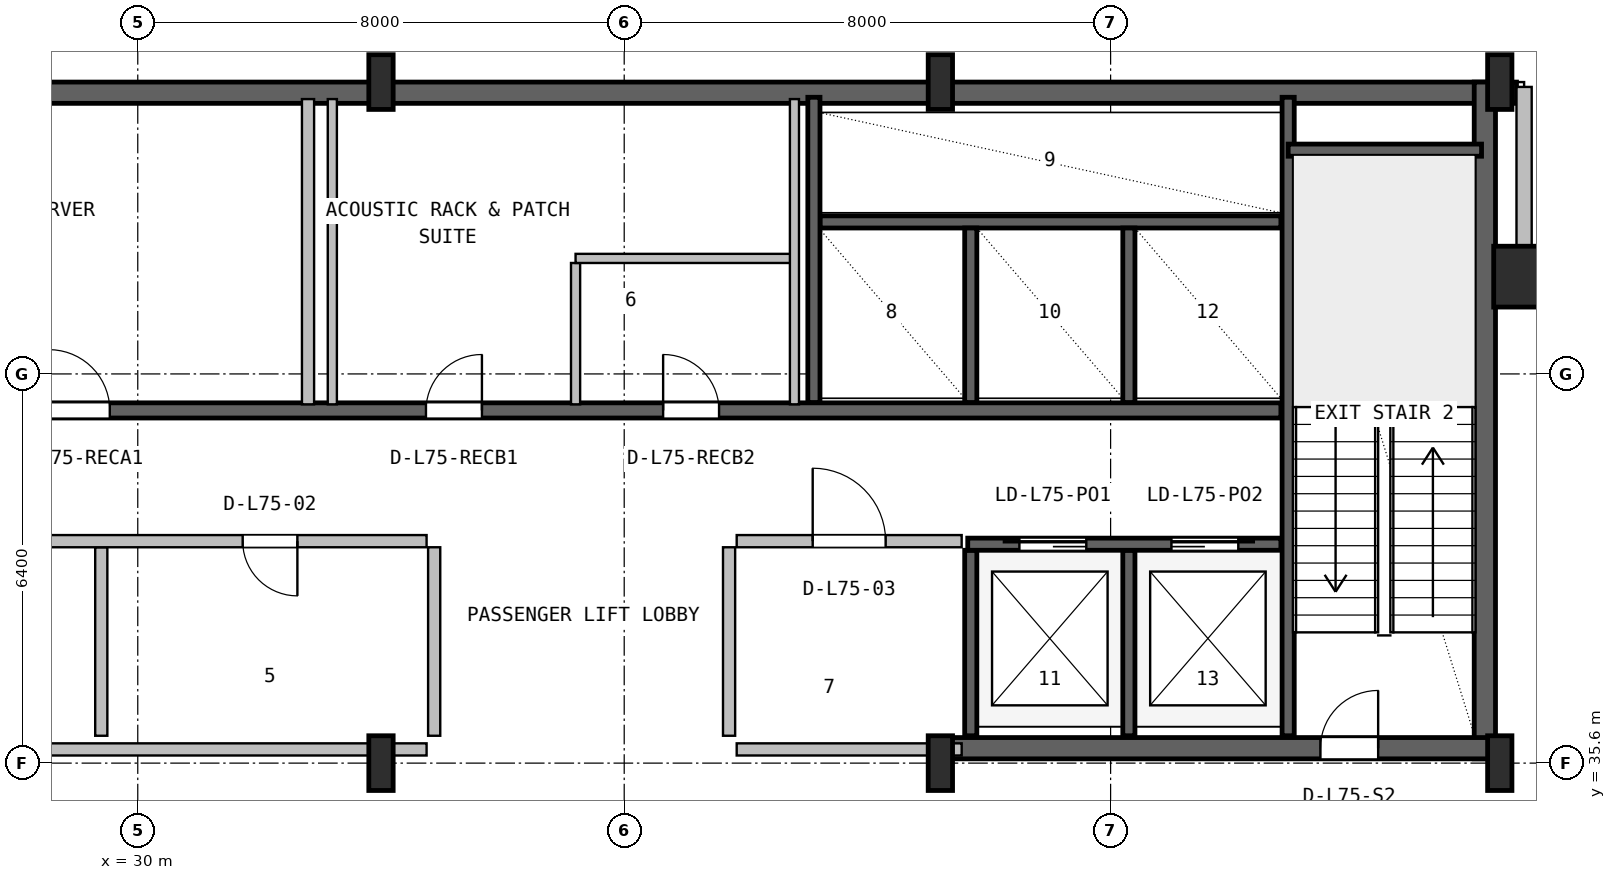
"""IFC4 building model, lengths in metres.
Left out: names, types, materials, properties, quantities, classifications, styles, units other than length and angle.
Written with IfcOpenShell. Run it as: python <this file> out.ifc"""

import sys

from ifc_helpers import new_model, si_unit, direction, frame, frame_2d, origin, origin_2d, place, context, subcontext, project, spatial, rectangle, hollow_rectangle, i_section, extrude, source, transform, mapped, element, fill, save


model = new_model("IFC4")
c1 = context("Model", 3, precision=1e-05, world=origin(), true_north=direction((0.0, 1.0)))
c2 = subcontext(c1, "Body", "Model", "MODEL_VIEW")
j1 = project(units=[si_unit("LENGTHUNIT", "METRE"), si_unit("PLANEANGLEUNIT", "RADIAN")], contexts=[c1])
p1 = place(None, origin())
s1 = spatial("IfcSite", under=j1, at=p1, CompositionType="ELEMENT")
p2 = place(p1, origin())
s2 = spatial("IfcBuilding", under=s1, at=p2, CompositionType="ELEMENT")
p3 = place(p2, frame((0.0, 0.0, 300.2)))
s3 = spatial("IfcBuildingStorey", under=s2, at=p3, CompositionType="ELEMENT", Elevation=300.2)
p4 = place(p3, frame((15.325, 46.625, 0.0), z_axis=(0.0, 0.0, 1.0), x_axis=(1.0, 0.0, 0.0)))
e1 = element("IfcWall", 1, at=p4, inside=s3, PredefinedType="SHEAR", context=c2, shape_type="SweptSolid", body=[
    extrude(rectangle(XDim=37.35, YDim=0.35, at=frame_2d((18.675, 0.0))), origin(), (0.0, 0.0, 1.0), 4.52),
])
p5 = place(p3, frame((52.155, 35.67, 0.0), z_axis=(0.0, 0.0, 1.0), x_axis=(0.0, 1.0, 0.0)))
e2 = element("IfcWall", 2, at=p5, inside=s3, PredefinedType="SHEAR", context=c2, shape_type="SweptSolid", body=[
    extrude(rectangle(XDim=11.13, YDim=0.35, at=frame_2d((5.565, 0.0))), origin(), (0.0, 0.0, 1.0), 4.52),
])
p6 = place(p3, frame((43.2, 35.845, 0.0), z_axis=(0.0, 0.0, 1.0), x_axis=(1.0, 0.0, 0.0)))
e3 = element("IfcWall", 3, at=p6, inside=s3, PredefinedType="SHEAR", context=c2, shape_type="SweptSolid", body=[
    extrude(rectangle(XDim=9.13, YDim=0.35, at=frame_2d((4.565, 0.0))), origin(), (0.0, 0.0, 1.0), 4.52),
])
p7 = place(p6, frame((6.25, 0.0, 0.0)))
e4 = element("IfcOpeningElement", 4, at=p7, cuts=e3, PredefinedType="OPENING", context=c2, shape_type="SweptSolid", body=[
    extrude(rectangle(XDim=0.95, YDim=2.1, at=frame_2d((0.475, 1.05))), frame((0.0, 0.185, 0.0), z_axis=(0.0, -1.0, 0.0), x_axis=(1.0, 0.0, 0.0)), (0.0, 0.0, 1.0), 0.37),
])
m1 = source(origin(), c2, "Body", "SweptSolid", [
    extrude(i_section(OverallWidth=0.4, OverallDepth=0.9, WebThickness=0.016, FlangeThickness=0.028, FilletRadius=0.016, at=origin_2d()), origin(), (0.0, 0.0, 1.0), 4.8),
])
for number, where, z_axis, x_axis in (
    (5, (34.0, 35.6, 0.0), (0.0, 0.0, 1.0), (1.0, 0.0, 0.0)),
    (6, (34.0, 46.8, 0.0), (0.0, 0.0, 1.0), (1.0, 0.0, 0.0)),
    (7, (43.2, 35.6, 0.0), (0.0, 0.0, 1.0), (1.0, 0.0, 0.0)),
    (8, (43.2, 46.8, 0.0), (0.0, 0.0, 1.0), (1.0, 0.0, 0.0)),
    (9, (52.4, 35.6, 0.0), (0.0, 0.0, 1.0), (1.0, 0.0, 0.0)),
    (10, (52.4, 46.8, 0.0), (0.0, 0.0, 1.0), (1.0, 0.0, 0.0)),
):
    element("IfcColumn", number, at=place(p3, frame(where, z_axis=z_axis, x_axis=x_axis)), inside=s3, PredefinedType="COLUMN", context=c2, shape_type="MappedRepresentation", body=[
        mapped(m1, transform((0.0, 0.0, 0.0), x_axis=(1.0, 0.0, 0.0), y_axis=(0.0, 1.0, 0.0), z_axis=(0.0, 0.0, 1.0), scale=1.0)),
    ])
m2 = source(origin(), c2, "Body", "SweptSolid", [
    extrude(hollow_rectangle(XDim=1.0, YDim=1.0, WallThickness=0.04, at=origin_2d()), origin(), (0.0, 0.0, 1.0), 4.8),
])
p8 = place(p3, frame((52.8, 43.6, 0.0), z_axis=(0.0, 0.0, 1.0), x_axis=(1.0, 0.0, 0.0)))
e11 = element("IfcColumn", 11, at=p8, inside=s3, PredefinedType="COLUMN", context=c2, shape_type="MappedRepresentation", body=[
    mapped(m2, transform((0.0, 0.0, 0.0), x_axis=(1.0, 0.0, 0.0), y_axis=(0.0, 1.0, 0.0), z_axis=(0.0, 0.0, 1.0), scale=1.0)),
])
p9 = place(p3, frame((52.93, 43.6, 0.0), z_axis=(0.0, 0.0, 1.0), x_axis=(1.0, 0.0, 0.0)))
e12 = element("IfcWall", 12, at=p9, inside=s3, PredefinedType="SOLIDWALL", context=c2, shape_type="SweptSolid", body=[
    extrude(rectangle(XDim=2.99, YDim=0.25, at=frame_2d((1.495, 0.0))), origin(), (0.0, 0.0, 1.0), 4.5),
])
p10 = place(p3, frame((52.8, 43.52, 0.0), z_axis=(0.0, 0.0, 1.0), x_axis=(0.0, 1.0, 0.0)))
e13 = element("IfcWall", 13, at=p10, inside=s3, PredefinedType="SOLIDWALL", context=c2, shape_type="SweptSolid", body=[
    extrude(rectangle(XDim=3.2, YDim=0.25, at=frame_2d((1.6, 0.0))), origin(), (0.0, 0.0, 1.0), 4.141),
])
p11 = place(p3, frame((48.92, 36.05, 0.0), z_axis=(0.0, 0.0, 1.0), x_axis=(0.0, 1.0, 0.0)))
e14 = element("IfcWall", 14, at=p11, inside=s3, PredefinedType="SHEAR", context=c2, shape_type="SweptSolid", body=[
    extrude(rectangle(XDim=10.5, YDim=0.2, at=frame_2d((5.25, 0.0))), origin(), (0.0, 0.0, 1.0), 4.52),
])
p12 = place(p3, frame((48.92, 45.68, 0.0), z_axis=(0.0, 0.0, 1.0), x_axis=(1.0, 0.0, 0.0)))
e15 = element("IfcWall", 15, at=p12, inside=s3, PredefinedType="SHEAR", context=c2, shape_type="SweptSolid", body=[
    extrude(rectangle(XDim=3.18, YDim=0.2, at=frame_2d((1.59, 0.0))), origin(), (0.0, 0.0, 1.0), 4.52),
])
p13 = place(p3, frame((24.98, 41.4, 0.0), z_axis=(0.0, 0.0, 1.0), x_axis=(1.0, 0.0, 0.0)))
e16 = element("IfcWall", 16, at=p13, inside=s3, PredefinedType="SHEAR", context=c2, shape_type="SweptSolid", body=[
    extrude(rectangle(XDim=23.82, YDim=0.25, at=frame_2d((11.91, 0.0))), origin(), (0.0, 0.0, 1.0), 4.52),
])
p14 = place(p13, frame((3.56, 0.0, 0.0)))
e17 = element("IfcOpeningElement", 17, at=p14, cuts=e16, PredefinedType="OPENING", context=c2, shape_type="SweptSolid", body=[
    extrude(rectangle(XDim=1.0, YDim=2.08, at=frame_2d((0.5, 1.04))), frame((0.0, 0.135, 0.0), z_axis=(0.0, -1.0, 0.0), x_axis=(1.0, 0.0, 0.0)), (0.0, 0.0, 1.0), 0.27),
])
p15 = place(p13, frame((9.76, 0.0, 0.0)))
e18 = element("IfcOpeningElement", 18, at=p15, cuts=e16, PredefinedType="OPENING", context=c2, shape_type="SweptSolid", body=[
    extrude(rectangle(XDim=0.92, YDim=2.08, at=frame_2d((0.46, 1.04))), frame((0.0, 0.135, 0.0), z_axis=(0.0, -1.0, 0.0), x_axis=(1.0, 0.0, 0.0)), (0.0, 0.0, 1.0), 0.27),
])
p16 = place(p13, frame((13.66, 0.0, 0.0)))
e19 = element("IfcOpeningElement", 19, at=p16, cuts=e16, PredefinedType="OPENING", context=c2, shape_type="SweptSolid", body=[
    extrude(rectangle(XDim=0.92, YDim=2.08, at=frame_2d((0.46, 1.04))), frame((0.0, 0.135, 0.0), z_axis=(0.0, -1.0, 0.0), x_axis=(1.0, 0.0, 0.0)), (0.0, 0.0, 1.0), 0.27),
])
p17 = place(p3, frame((41.22, 44.5, 0.0), z_axis=(0.0, 0.0, 1.0), x_axis=(1.0, 0.0, 0.0)))
e20 = element("IfcWall", 20, at=p17, inside=s3, PredefinedType="SHEAR", context=c2, shape_type="SweptSolid", body=[
    extrude(rectangle(XDim=7.58, YDim=0.2, at=frame_2d((3.79, 0.0))), origin(), (0.0, 0.0, 1.0), 4.52),
])
p18 = place(p3, frame((41.12, 41.53, 0.0), z_axis=(0.0, 0.0, 1.0), x_axis=(0.0, 1.0, 0.0)))
e21 = element("IfcWall", 21, at=p18, inside=s3, PredefinedType="SHEAR", context=c2, shape_type="SweptSolid", body=[
    extrude(rectangle(XDim=5.02, YDim=0.2, at=frame_2d((2.51, 0.0))), origin(), (0.0, 0.0, 1.0), 4.52),
])
for number, where, z_axis, x_axis in (
    (22, (43.7, 41.53, 0.0), (0.0, 0.0, 1.0), (0.0, 1.0, 0.0)),
    (23, (46.3, 41.53, 0.0), (0.0, 0.0, 1.0), (0.0, 1.0, 0.0)),
):
    element("IfcWall", number, at=place(p3, frame(where, z_axis=z_axis, x_axis=x_axis)), inside=s3, PredefinedType="SHEAR", context=c2, shape_type="SweptSolid", body=[
        extrude(rectangle(XDim=2.87, YDim=0.2, at=frame_2d((1.435, 0.0))), origin(), (0.0, 0.0, 1.0), 4.52),
    ])
for number, where, z_axis, x_axis in (
    (24, (43.7, 36.05, 0.0), (0.0, 0.0, 1.0), (0.0, 1.0, 0.0)),
    (25, (46.3, 36.05, 0.0), (0.0, 0.0, 1.0), (0.0, 1.0, 0.0)),
):
    element("IfcWall", number, at=place(p3, frame(where, z_axis=z_axis, x_axis=x_axis)), inside=s3, PredefinedType="SHEAR", context=c2, shape_type="SweptSolid", body=[
        extrude(rectangle(XDim=3.05, YDim=0.2, at=frame_2d((1.525, 0.0))), origin(), (0.0, 0.0, 1.0), 4.52),
    ])
p19 = place(p3, frame((43.65, 39.2, 0.0), z_axis=(0.0, 0.0, 1.0), x_axis=(1.0, 0.0, 0.0)))
e26 = element("IfcWall", 26, at=p19, inside=s3, PredefinedType="SHEAR", context=c2, shape_type="SweptSolid", body=[
    extrude(rectangle(XDim=5.15, YDim=0.2, at=frame_2d((2.575, 0.0))), origin(), (0.0, 0.0, 1.0), 4.52),
])
p20 = place(p19, frame((0.85, 0.0, 0.0)))
e27 = element("IfcOpeningElement", 27, at=p20, cuts=e26, PredefinedType="OPENING", context=c2, shape_type="SweptSolid", body=[
    extrude(rectangle(XDim=1.1, YDim=2.18, at=frame_2d((0.55, 1.09))), frame((0.0, 0.11, 0.0), z_axis=(0.0, -1.0, 0.0), x_axis=(1.0, 0.0, 0.0)), (0.0, 0.0, 1.0), 0.22),
])
p21 = place(p19, frame((3.35, 0.0, 0.0)))
e28 = element("IfcOpeningElement", 28, at=p21, cuts=e26, PredefinedType="OPENING", context=c2, shape_type="SweptSolid", body=[
    extrude(rectangle(XDim=1.1, YDim=2.18, at=frame_2d((0.55, 1.09))), frame((0.0, 0.11, 0.0), z_axis=(0.0, -1.0, 0.0), x_axis=(1.0, 0.0, 0.0)), (0.0, 0.0, 1.0), 0.22),
])
p22 = place(p3, frame((25.0, 35.825, 0.0), z_axis=(0.0, 0.0, 1.0), x_axis=(1.0, 0.0, 0.0)))
e29 = element("IfcWall", 29, at=p22, inside=s3, PredefinedType="PLUMBINGWALL", context=c2, shape_type="SweptSolid", body=[
    extrude(rectangle(XDim=9.75, YDim=0.2, at=frame_2d((4.875, 0.0))), origin(), (0.0, 0.0, 1.0), 3.545),
])
p23 = place(p3, frame((29.4, 36.05, 0.0), z_axis=(0.0, 0.0, 1.0), x_axis=(0.0, 1.0, 0.0)))
e30 = element("IfcWall", 30, at=p23, inside=s3, PredefinedType="PLUMBINGWALL", context=c2, shape_type="SweptSolid", body=[
    extrude(rectangle(XDim=3.1, YDim=0.2, at=frame_2d((1.55, 0.0))), origin(), (0.0, 0.0, 1.0), 4.5),
])
p24 = place(p3, frame((25.0, 39.25, 0.0), z_axis=(0.0, 0.0, 1.0), x_axis=(1.0, 0.0, 0.0)))
e31 = element("IfcWall", 31, at=p24, inside=s3, PredefinedType="PLUMBINGWALL", context=c2, shape_type="SweptSolid", body=[
    extrude(rectangle(XDim=9.75, YDim=0.2, at=frame_2d((4.875, 0.0))), origin(), (0.0, 0.0, 1.0), 4.5),
])
p25 = place(p24, frame((1.75, 0.0, 0.0)))
e32 = element("IfcOpeningElement", 32, at=p25, cuts=e31, PredefinedType="OPENING", context=c2, shape_type="SweptSolid", body=[
    extrude(rectangle(XDim=0.9, YDim=2.06, at=frame_2d((0.45, 1.03))), frame((0.0, 0.11, 0.0), z_axis=(0.0, -1.0, 0.0), x_axis=(1.0, 0.0, 0.0)), (0.0, 0.0, 1.0), 0.22),
])
p26 = place(p24, frame((6.725, 0.0, 0.0)))
e33 = element("IfcOpeningElement", 33, at=p26, cuts=e31, PredefinedType="OPENING", context=c2, shape_type="SweptSolid", body=[
    extrude(rectangle(XDim=0.9, YDim=2.06, at=frame_2d((0.45, 1.03))), frame((0.0, 0.11, 0.0), z_axis=(0.0, -1.0, 0.0), x_axis=(1.0, 0.0, 0.0)), (0.0, 0.0, 1.0), 0.22),
])
p27 = place(p3, frame((34.875, 36.05, 0.0), z_axis=(0.0, 0.0, 1.0), x_axis=(0.0, 1.0, 0.0)))
e34 = element("IfcWall", 34, at=p27, inside=s3, PredefinedType="PLUMBINGWALL", context=c2, shape_type="SweptSolid", body=[
    extrude(rectangle(XDim=3.1, YDim=0.2, at=frame_2d((1.55, 0.0))), origin(), (0.0, 0.0, 1.0), 4.5),
])
p28 = place(p3, frame((39.85, 35.825, 0.0), z_axis=(0.0, 0.0, 1.0), x_axis=(1.0, 0.0, 0.0)))
e35 = element("IfcWall", 35, at=p28, inside=s3, PredefinedType="SOLIDWALL", context=c2, shape_type="SweptSolid", body=[
    extrude(rectangle(XDim=3.7, YDim=0.2, at=frame_2d((1.85, 0.0))), origin(), (0.0, 0.0, 1.0), 3.545),
])
p29 = place(p3, frame((39.85, 39.25, 0.0), z_axis=(0.0, 0.0, 1.0), x_axis=(1.0, 0.0, 0.0)))
e36 = element("IfcWall", 36, at=p29, inside=s3, PredefinedType="SOLIDWALL", context=c2, shape_type="SweptSolid", body=[
    extrude(rectangle(XDim=3.7, YDim=0.2, at=frame_2d((1.85, 0.0))), origin(), (0.0, 0.0, 1.0), 4.5),
])
p30 = place(p29, frame((1.25, 0.0, 0.0)))
e37 = element("IfcOpeningElement", 37, at=p30, cuts=e36, PredefinedType="OPENING", context=c2, shape_type="SweptSolid", body=[
    extrude(rectangle(XDim=1.2, YDim=2.1, at=frame_2d((0.6, 1.05))), frame((0.0, 0.11, 0.0), z_axis=(0.0, -1.0, 0.0), x_axis=(1.0, 0.0, 0.0)), (0.0, 0.0, 1.0), 0.22),
])
p31 = place(p3, frame((39.725, 36.05, 0.0), z_axis=(0.0, 0.0, 1.0), x_axis=(0.0, 1.0, 0.0)))
e38 = element("IfcWall", 38, at=p31, inside=s3, PredefinedType="SOLIDWALL", context=c2, shape_type="SweptSolid", body=[
    extrude(rectangle(XDim=3.1, YDim=0.2, at=frame_2d((1.55, 0.0))), origin(), (0.0, 0.0, 1.0), 4.5),
])
p32 = place(p3, frame((32.8, 41.5, 0.0), z_axis=(0.0, 0.0, 1.0), x_axis=(0.0, 1.0, 0.0)))
e39 = element("IfcWall", 39, at=p32, inside=s3, PredefinedType="SOLIDWALL", context=c2, shape_type="SweptSolid", body=[
    extrude(rectangle(XDim=5.02, YDim=0.2, at=frame_2d((2.51, 0.0))), origin(), (0.0, 0.0, 1.0), 4.5),
])
p33 = place(p3, frame((37.2, 41.5, 0.0), z_axis=(0.0, 0.0, 1.0), x_axis=(0.0, 1.0, 0.0)))
e40 = element("IfcWall", 40, at=p33, inside=s3, PredefinedType="PARTITIONING", context=c2, shape_type="SweptSolid", body=[
    extrude(rectangle(XDim=2.325, YDim=0.15, at=frame_2d((1.163, 0.0))), origin(), (0.0, 0.0, 1.0), 4.5),
])
p34 = place(p3, frame((37.2, 43.9, 0.0), z_axis=(0.0, 0.0, 1.0), x_axis=(1.0, 0.0, 0.0)))
e41 = element("IfcWall", 41, at=p34, inside=s3, PredefinedType="PARTITIONING", context=c2, shape_type="SweptSolid", body=[
    extrude(rectangle(XDim=3.6, YDim=0.15, at=frame_2d((1.8, 0.0))), origin(), (0.0, 0.0, 1.0), 4.5),
])
for number, where, z_axis, x_axis in (
    (42, (40.8, 41.5, 0.0), (0.0, 0.0, 1.0), (0.0, 1.0, 0.0)),
    (43, (33.2, 41.5, 0.0), (0.0, 0.0, 1.0), (0.0, 1.0, 0.0)),
):
    element("IfcWall", number, at=place(p3, frame(where, z_axis=z_axis, x_axis=x_axis)), inside=s3, PredefinedType="PARTITIONING", context=c2, shape_type="SweptSolid", body=[
        extrude(rectangle(XDim=5.02, YDim=0.15, at=frame_2d((2.51, 0.0))), origin(), (0.0, 0.0, 1.0), 4.5),
    ])
m3 = source(origin(), c2, "Body", "SweptSolid", [
    extrude(rectangle(XDim=0.95, YDim=2.1, at=frame_2d((0.475, 1.05))), frame((0.0, 0.025, 0.0), z_axis=(0.0, -1.0, 0.0), x_axis=(1.0, 0.0, 0.0)), (0.0, 0.0, 1.0), 0.05),
])
p35 = place(p7, origin())
e44 = element("IfcDoor", 44, at=p35, inside=s3, OperationType="SINGLE_SWING_RIGHT", PredefinedType="DOOR", context=c2, shape_type="MappedRepresentation", body=[
    mapped(m3, transform((0.0, 0.0, 0.0), x_axis=(1.0, 0.0, 0.0), y_axis=(0.0, 1.0, 0.0), z_axis=(0.0, 0.0, 1.0), scale=1.0)),
])
fill(e4, e44)
m4 = source(origin(), c2, "Body", "SweptSolid", [
    extrude(rectangle(XDim=1.0, YDim=2.08, at=frame_2d((0.5, 1.04))), frame((0.0, 0.025, 0.0), z_axis=(0.0, -1.0, 0.0), x_axis=(1.0, 0.0, 0.0)), (0.0, 0.0, 1.0), 0.05),
])
p36 = place(p14, origin())
e45 = element("IfcDoor", 45, at=p36, inside=s3, OperationType="SINGLE_SWING_LEFT", PredefinedType="DOOR", context=c2, shape_type="MappedRepresentation", body=[
    mapped(m4, transform((0.0, 0.0, 0.0), x_axis=(1.0, 0.0, 0.0), y_axis=(0.0, 1.0, 0.0), z_axis=(0.0, 0.0, 1.0), scale=1.0)),
])
fill(e17, e45)
m5 = source(origin(), c2, "Body", "SweptSolid", [
    extrude(rectangle(XDim=0.92, YDim=2.08, at=frame_2d((0.46, 1.04))), frame((0.0, 0.025, 0.0), z_axis=(0.0, -1.0, 0.0), x_axis=(1.0, 0.0, 0.0)), (0.0, 0.0, 1.0), 0.05),
])
p37 = place(p15, origin())
e46 = element("IfcDoor", 46, at=p37, inside=s3, OperationType="SINGLE_SWING_RIGHT", PredefinedType="DOOR", context=c2, shape_type="MappedRepresentation", body=[
    mapped(m5, transform((0.0, 0.0, 0.0), x_axis=(1.0, 0.0, 0.0), y_axis=(0.0, 1.0, 0.0), z_axis=(0.0, 0.0, 1.0), scale=1.0)),
])
fill(e18, e46)
p38 = place(p16, origin())
e47 = element("IfcDoor", 47, at=p38, inside=s3, OperationType="SINGLE_SWING_LEFT", PredefinedType="DOOR", context=c2, shape_type="MappedRepresentation", body=[
    mapped(m5, transform((0.0, 0.0, 0.0), x_axis=(1.0, 0.0, 0.0), y_axis=(0.0, 1.0, 0.0), z_axis=(0.0, 0.0, 1.0), scale=1.0)),
])
fill(e19, e47)
m6 = source(origin(), c2, "Body", "SweptSolid", [
    extrude(rectangle(XDim=1.1, YDim=2.18, at=frame_2d((0.55, 1.09))), frame((0.0, 0.025, 0.0), z_axis=(0.0, -1.0, 0.0), x_axis=(1.0, 0.0, 0.0)), (0.0, 0.0, 1.0), 0.05),
])
p39 = place(p20, origin())
e48 = element("IfcDoor", 48, at=p39, inside=s3, OperationType="SLIDING_TO_LEFT", PredefinedType="DOOR", context=c2, shape_type="MappedRepresentation", body=[
    mapped(m6, transform((0.0, 0.0, 0.0), x_axis=(1.0, 0.0, 0.0), y_axis=(0.0, 1.0, 0.0), z_axis=(0.0, 0.0, 1.0), scale=1.0)),
])
fill(e27, e48)
p40 = place(p21, origin())
e49 = element("IfcDoor", 49, at=p40, inside=s3, OperationType="SLIDING_TO_RIGHT", PredefinedType="DOOR", context=c2, shape_type="MappedRepresentation", body=[
    mapped(m6, transform((0.0, 0.0, 0.0), x_axis=(1.0, 0.0, 0.0), y_axis=(0.0, 1.0, 0.0), z_axis=(0.0, 0.0, 1.0), scale=1.0)),
])
fill(e28, e49)
m7 = source(origin(), c2, "Body", "SweptSolid", [
    extrude(rectangle(XDim=0.9, YDim=2.06, at=frame_2d((0.45, 1.03))), frame((0.0, 0.025, 0.0), z_axis=(0.0, -1.0, 0.0), x_axis=(1.0, 0.0, 0.0)), (0.0, 0.0, 1.0), 0.05),
])
p41 = place(p26, frame((0.9, 0.0, 0.0), z_axis=(0.0, 0.0, 1.0), x_axis=(-1.0, 0.0, 0.0)))
e50 = element("IfcDoor", 50, at=p41, inside=s3, OperationType="SINGLE_SWING_RIGHT", PredefinedType="DOOR", context=c2, shape_type="MappedRepresentation", body=[
    mapped(m7, transform((0.0, 0.0, 0.0), x_axis=(1.0, 0.0, 0.0), y_axis=(0.0, 1.0, 0.0), z_axis=(0.0, 0.0, 1.0), scale=1.0)),
])
fill(e33, e50)
m8 = source(origin(), c2, "Body", "SweptSolid", [
    extrude(rectangle(XDim=1.2, YDim=2.1, at=frame_2d((0.6, 1.05))), frame((0.0, 0.025, 0.0), z_axis=(0.0, -1.0, 0.0), x_axis=(1.0, 0.0, 0.0)), (0.0, 0.0, 1.0), 0.05),
])
p42 = place(p30, origin())
e51 = element("IfcDoor", 51, at=p42, inside=s3, OperationType="SINGLE_SWING_LEFT", PredefinedType="DOOR", context=c2, shape_type="MappedRepresentation", body=[
    mapped(m8, transform((0.0, 0.0, 0.0), x_axis=(1.0, 0.0, 0.0), y_axis=(0.0, 1.0, 0.0), z_axis=(0.0, 0.0, 1.0), scale=1.0)),
])
fill(e37, e51)
save(model, sys.argv[1])
